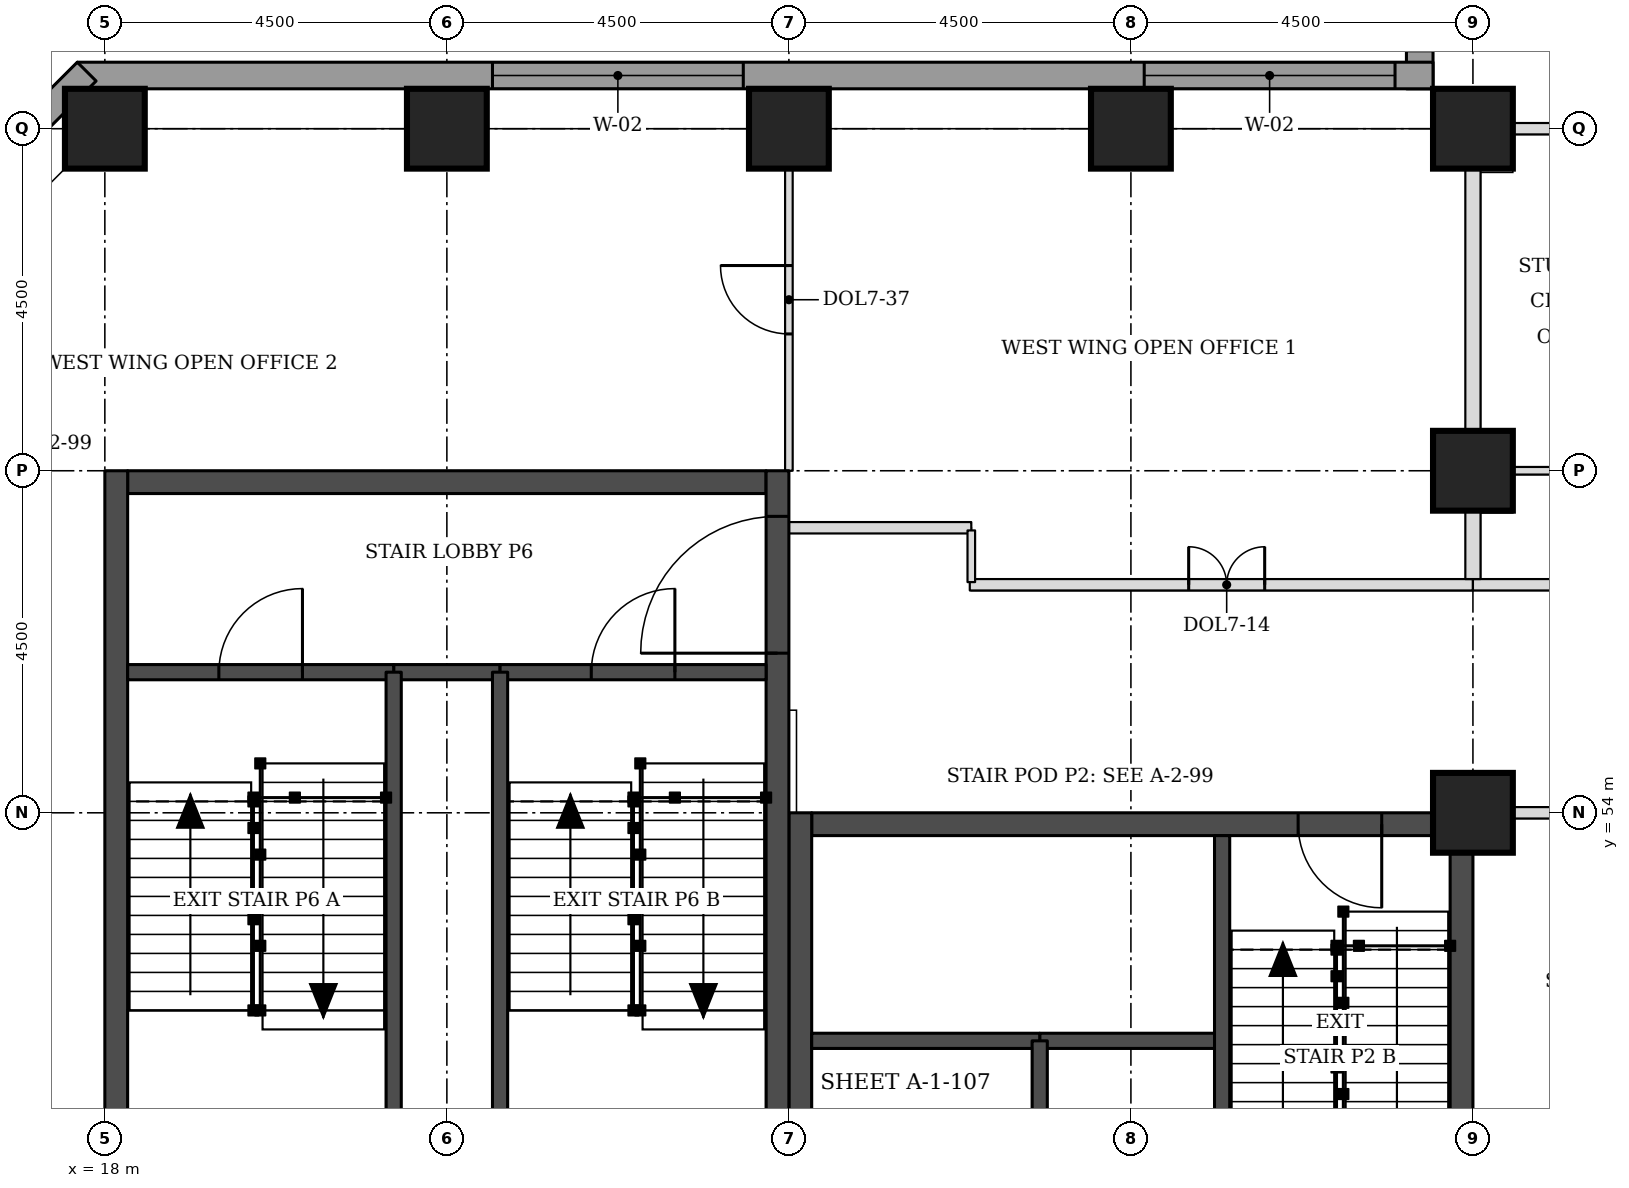
"""IFC4 building model, lengths in metres.
Left out: names, types, materials, properties, quantities, classifications, styles, units other than length and angle.
Written with IfcOpenShell. Run it as: python <this file> out.ifc"""

import sys

from ifc_helpers import new_model, si_unit, direction, frame, frame_2d, origin, origin_2d, place, context, subcontext, project, spatial, rectangle, extrude, element, fill, save


model = new_model("IFC4")
c1 = context("Model", 3, precision=1e-05, world=origin(), true_north=direction((0.0, 1.0)))
c2 = subcontext(c1, "Body", "Model", "MODEL_VIEW")
j1 = project(units=[si_unit("LENGTHUNIT", "METRE"), si_unit("PLANEANGLEUNIT", "RADIAN")], contexts=[c1])
p1 = place(None, origin())
s1 = spatial("IfcSite", under=j1, at=p1, CompositionType="ELEMENT")
p2 = place(p1, origin())
s2 = spatial("IfcBuilding", under=s1, at=p2, CompositionType="ELEMENT")
p3 = place(p2, frame((0.0, 0.0, 130.7)))
s3 = spatial("IfcBuildingStorey", under=s2, at=p3, CompositionType="ELEMENT", Elevation=130.7)
for number, where, z_axis, x_axis in (
    (1, (36.0, 54.0, 0.0), (0.0, 0.0, 1.0), (1.0, 0.0, 0.0)),
    (2, (36.0, 58.5, 0.0), (0.0, 0.0, 1.0), (1.0, 0.0, 0.0)),
    (3, (18.0, 63.0, 0.0), (0.0, 0.0, 1.0), (1.0, 0.0, 0.0)),
    (4, (22.5, 63.0, 0.0), (0.0, 0.0, 1.0), (1.0, 0.0, 0.0)),
    (5, (27.0, 63.0, 0.0), (0.0, 0.0, 1.0), (1.0, 0.0, 0.0)),
    (6, (31.5, 63.0, 0.0), (0.0, 0.0, 1.0), (1.0, 0.0, 0.0)),
    (7, (36.0, 63.0, 0.0), (0.0, 0.0, 1.0), (1.0, 0.0, 0.0)),
):
    element("IfcColumn", number, at=place(p3, frame(where, z_axis=z_axis, x_axis=x_axis)), inside=s3, PredefinedType="COLUMN", context=c2, shape_type="SweptSolid", body=[
        extrude(rectangle(XDim=1.05, YDim=1.05, at=origin_2d()), origin(), (0.0, 0.0, 1.0), 3.7),
    ])
p4 = place(p3, frame((27.3, 53.85, 0.0), z_axis=(0.0, 0.0, 1.0), x_axis=(1.0, 0.0, 0.0)))
e8 = element("IfcWall", 8, at=p4, inside=s3, PredefinedType="SHEAR", context=c2, shape_type="SweptSolid", body=[
    extrude(rectangle(XDim=8.4, YDim=0.3, at=frame_2d((4.2, 0.0))), origin(), (0.0, 0.0, 1.0), 3.7),
])
p5 = place(p4, frame((6.4, 0.0, 0.0)))
e9 = element("IfcOpeningElement", 9, at=p5, cuts=e8, PredefinedType="OPENING", context=c2, shape_type="SweptSolid", body=[
    extrude(rectangle(XDim=1.1, YDim=2.1, at=frame_2d((0.55, 1.05))), frame((0.0, 0.16, 0.0), z_axis=(0.0, -1.0, 0.0), x_axis=(1.0, 0.0, 0.0)), (0.0, 0.0, 1.0), 0.32),
])
p6 = place(p3, frame((27.15, 45.0, 0.0), z_axis=(0.0, 0.0, 1.0), x_axis=(0.0, 1.0, 0.0)))
e10 = element("IfcWall", 10, at=p6, inside=s3, PredefinedType="SHEAR", context=c2, shape_type="SweptSolid", body=[
    extrude(rectangle(XDim=9.0, YDim=0.3, at=frame_2d((4.5, 0.0))), origin(), (0.0, 0.0, 1.0), 3.7),
])
p7 = place(p6, frame((0.4, 0.0, 0.0)))
e11 = element("IfcOpeningElement", 11, at=p7, cuts=e10, PredefinedType="OPENING", context=c2, shape_type="SweptSolid", body=[
    extrude(rectangle(XDim=1.1, YDim=2.1, at=frame_2d((0.55, 1.05))), frame((0.0, 0.16, 0.0), z_axis=(0.0, -1.0, 0.0), x_axis=(1.0, 0.0, 0.0)), (0.0, 0.0, 1.0), 0.32),
])
p8 = place(p3, frame((35.85, 45.0, 0.0), z_axis=(0.0, 0.0, 1.0), x_axis=(0.0, 1.0, 0.0)))
e12 = element("IfcWall", 12, at=p8, inside=s3, PredefinedType="SHEAR", context=c2, shape_type="SweptSolid", body=[
    extrude(rectangle(XDim=9.0, YDim=0.3, at=frame_2d((4.5, 0.0))), origin(), (0.0, 0.0, 1.0), 3.7),
])
p9 = place(p3, frame((18.3, 58.35, 0.0), z_axis=(0.0, 0.0, 1.0), x_axis=(1.0, 0.0, 0.0)))
e13 = element("IfcWall", 13, at=p9, inside=s3, PredefinedType="SHEAR", context=c2, shape_type="SweptSolid", body=[
    extrude(rectangle(XDim=8.4, YDim=0.3, at=frame_2d((4.2, 0.0))), origin(), (0.0, 0.0, 1.0), 3.7),
])
p10 = place(p3, frame((18.15, 49.5, 0.0), z_axis=(0.0, 0.0, 1.0), x_axis=(0.0, 1.0, 0.0)))
e14 = element("IfcWall", 14, at=p10, inside=s3, PredefinedType="SHEAR", context=c2, shape_type="SweptSolid", body=[
    extrude(rectangle(XDim=9.0, YDim=0.3, at=frame_2d((4.5, 0.0))), origin(), (0.0, 0.0, 1.0), 3.7),
])
p11 = place(p3, frame((26.85, 49.5, 0.0), z_axis=(0.0, 0.0, 1.0), x_axis=(0.0, 1.0, 0.0)))
e15 = element("IfcWall", 15, at=p11, inside=s3, PredefinedType="SHEAR", context=c2, shape_type="SweptSolid", body=[
    extrude(rectangle(XDim=9.0, YDim=0.3, at=frame_2d((4.5, 0.0))), origin(), (0.0, 0.0, 1.0), 3.7),
])
p12 = place(p11, frame((6.6, 0.0, 0.0)))
e16 = element("IfcOpeningElement", 16, at=p12, cuts=e15, PredefinedType="OPENING", context=c2, shape_type="SweptSolid", body=[
    extrude(rectangle(XDim=1.8, YDim=2.1, at=frame_2d((0.9, 1.05))), frame((0.0, 0.16, 0.0), z_axis=(0.0, -1.0, 0.0), x_axis=(1.0, 0.0, 0.0)), (0.0, 0.0, 1.0), 0.32),
])
p13 = place(p3, frame((35.3, 76.862, 0.0), z_axis=(0.0, 0.0, 1.0), x_axis=(0.0, -1.0, 0.0)))
e17 = element("IfcWall", 17, at=p13, inside=s3, PredefinedType="STANDARD", context=c2, shape_type="SweptSolid", body=[
    extrude(rectangle(XDim=13.337, YDim=0.35, at=frame_2d((6.669, 0.0))), origin(), (0.0, 0.0, 1.0), 3.525),
])
p14 = place(p13, frame((9.537, 0.0, 0.9)))
e18 = element("IfcOpeningElement", 18, at=p14, cuts=e17, PredefinedType="OPENING", context=c2, shape_type="SweptSolid", body=[
    extrude(rectangle(XDim=3.3, YDim=1.9, at=frame_2d((1.65, 0.95))), frame((0.0, 0.185, 0.0), z_axis=(0.0, -1.0, 0.0), x_axis=(1.0, 0.0, 0.0)), (0.0, 0.0, 1.0), 0.37),
])
p15 = place(p3, frame((35.475, 63.7, 0.0), z_axis=(0.0, 0.0, 1.0), x_axis=(-1.0, 0.0, 0.0)))
e19 = element("IfcWall", 19, at=p15, inside=s3, PredefinedType="STANDARD", context=c2, shape_type="SweptSolid", body=[
    extrude(rectangle(XDim=17.837, YDim=0.35, at=frame_2d((8.919, 0.0))), origin(), (0.0, 0.0, 1.0), 3.525),
])
p16 = place(p15, frame((0.5, 0.0, 0.9)))
e20 = element("IfcOpeningElement", 20, at=p16, cuts=e19, PredefinedType="OPENING", context=c2, shape_type="SweptSolid", body=[
    extrude(rectangle(XDim=3.3, YDim=1.9, at=frame_2d((1.65, 0.95))), frame((0.0, 0.185, 0.0), z_axis=(0.0, -1.0, 0.0), x_axis=(1.0, 0.0, 0.0)), (0.0, 0.0, 1.0), 0.37),
])
p17 = place(p15, frame((9.075, 0.0, 0.9)))
e21 = element("IfcOpeningElement", 21, at=p17, cuts=e19, PredefinedType="OPENING", context=c2, shape_type="SweptSolid", body=[
    extrude(rectangle(XDim=3.3, YDim=1.9, at=frame_2d((1.65, 0.95))), frame((0.0, 0.185, 0.0), z_axis=(0.0, -1.0, 0.0), x_axis=(1.0, 0.0, 0.0)), (0.0, 0.0, 1.0), 0.37),
])
p18 = place(p3, frame((17.761, 63.751, 0.0), z_axis=(0.0, 0.0, 1.0), x_axis=(-0.707106781187, -0.707106781187, 0.0)))
e22 = element("IfcWall", 22, at=p18, inside=s3, PredefinedType="STANDARD", context=c2, shape_type="SweptSolid", body=[
    extrude(rectangle(XDim=7.089, YDim=0.35, at=frame_2d((3.544, 0.0))), origin(), (0.0, 0.0, 1.0), 3.525),
])
p19 = place(p18, frame((1.894, 0.0, 0.9)))
e23 = element("IfcOpeningElement", 23, at=p19, cuts=e22, PredefinedType="OPENING", context=c2, shape_type="SweptSolid", body=[
    extrude(rectangle(XDim=3.3, YDim=1.9, at=frame_2d((1.65, 0.95))), frame((0.0, 0.185, 0.0), z_axis=(0.0, -1.0, 0.0), x_axis=(1.0, 0.0, 0.0)), (0.0, 0.0, 1.0), 0.37),
])
p20 = place(p3, frame((36.525, 54.0, 0.0), z_axis=(0.0, 0.0, 1.0), x_axis=(1.0, 0.0, 0.0)))
e24 = element("IfcWall", 24, at=p20, inside=s3, PredefinedType="PARTITIONING", context=c2, shape_type="SweptSolid", body=[
    extrude(rectangle(XDim=5.55, YDim=0.15, at=frame_2d((2.775, 0.0))), origin(), (0.0, 0.0, 1.0), 3.55),
])
p21 = place(p3, frame((29.38, 57.0, 0.0), z_axis=(0.0, 0.0, 1.0), x_axis=(1.0, 0.0, 0.0)))
e25 = element("IfcWall", 25, at=p21, inside=s3, PredefinedType="PARTITIONING", context=c2, shape_type="SweptSolid", body=[
    extrude(rectangle(XDim=6.62, YDim=0.15, at=frame_2d((3.31, 0.0))), origin(), (0.0, 0.0, 1.0), 3.55),
])
p22 = place(p21, frame((2.88, 0.0, 0.0)))
e26 = element("IfcOpeningElement", 26, at=p22, cuts=e25, PredefinedType="OPENING", context=c2, shape_type="SweptSolid", body=[
    extrude(rectangle(XDim=1.0, YDim=2.1, at=frame_2d((0.5, 1.05))), frame((0.0, 0.085, 0.0), z_axis=(0.0, -1.0, 0.0), x_axis=(1.0, 0.0, 0.0)), (0.0, 0.0, 1.0), 0.17),
])
p23 = place(p3, frame((36.0, 57.0, 0.0), z_axis=(0.0, 0.0, 1.0), x_axis=(1.0, 0.0, 0.0)))
e27 = element("IfcWall", 27, at=p23, inside=s3, PredefinedType="PARTITIONING", context=c2, shape_type="SweptSolid", body=[
    extrude(rectangle(XDim=6.075, YDim=0.15, at=frame_2d((3.038, 0.0))), origin(), (0.0, 0.0, 1.0), 3.55),
])
p24 = place(p23, frame((2.55, 0.0, 0.0)))
e28 = element("IfcOpeningElement", 28, at=p24, cuts=e27, PredefinedType="OPENING", context=c2, shape_type="SweptSolid", body=[
    extrude(rectangle(XDim=1.0, YDim=2.1, at=frame_2d((0.5, 1.05))), frame((0.0, 0.085, 0.0), z_axis=(0.0, -1.0, 0.0), x_axis=(1.0, 0.0, 0.0)), (0.0, 0.0, 1.0), 0.17),
])
p25 = place(p3, frame((36.525, 58.5, 0.0), z_axis=(0.0, 0.0, 1.0), x_axis=(1.0, 0.0, 0.0)))
e29 = element("IfcWall", 29, at=p25, inside=s3, PredefinedType="PARTITIONING", context=c2, shape_type="SweptSolid", body=[
    extrude(rectangle(XDim=2.525, YDim=0.1, at=frame_2d((1.263, 0.0))), origin(), (0.0, 0.0, 1.0), 3.55),
])
p26 = place(p25, frame((0.8, 0.0, 0.0)))
e30 = element("IfcOpeningElement", 30, at=p26, cuts=e29, PredefinedType="OPENING", context=c2, shape_type="SweptSolid", body=[
    extrude(rectangle(XDim=0.9, YDim=2.1, at=frame_2d((0.45, 1.05))), frame((0.0, 0.06, 0.0), z_axis=(0.0, -1.0, 0.0), x_axis=(1.0, 0.0, 0.0)), (0.0, 0.0, 1.0), 0.12),
])
p27 = place(p3, frame((36.525, 63.0, 0.0), z_axis=(0.0, 0.0, 1.0), x_axis=(1.0, 0.0, 0.0)))
e31 = element("IfcWall", 31, at=p27, inside=s3, PredefinedType="PARTITIONING", context=c2, shape_type="SweptSolid", body=[
    extrude(rectangle(XDim=2.4, YDim=0.15, at=frame_2d((1.2, 0.0))), origin(), (0.0, 0.0, 1.0), 3.55),
])
p28 = place(p3, frame((36.0, 57.075, 0.0), z_axis=(0.0, 0.0, 1.0), x_axis=(0.0, 1.0, 0.0)))
e32 = element("IfcWall", 32, at=p28, inside=s3, PredefinedType="PARTITIONING", context=c2, shape_type="SweptSolid", body=[
    extrude(rectangle(XDim=0.9, YDim=0.2, at=frame_2d((0.45, 0.0))), origin(), (0.0, 0.0, 1.0), 2.8),
])
p29 = place(p3, frame((36.0, 58.995, 0.0), z_axis=(0.0, 0.0, 1.0), x_axis=(0.0, 1.0, 0.0)))
e33 = element("IfcWall", 33, at=p29, inside=s3, PredefinedType="PARTITIONING", context=c2, shape_type="SweptSolid", body=[
    extrude(rectangle(XDim=3.48, YDim=0.2, at=frame_2d((1.74, 0.0))), origin(), (0.0, 0.0, 1.0), 2.8),
])
p30 = place(p3, frame((27.0, 63.0, 0.0), z_axis=(0.0, 0.0, 1.0), x_axis=(0.0, -1.0, 0.0)))
e34 = element("IfcWall", 34, at=p30, inside=s3, PredefinedType="PARTITIONING", context=c2, shape_type="SweptSolid", body=[
    extrude(rectangle(XDim=4.5, YDim=0.1, at=frame_2d((2.25, 0.0))), origin(), (0.0, 0.0, 1.0), 3.55),
])
p31 = place(p30, frame((1.8, 0.0, 0.0)))
e35 = element("IfcOpeningElement", 35, at=p31, cuts=e34, PredefinedType="OPENING", context=c2, shape_type="SweptSolid", body=[
    extrude(rectangle(XDim=0.9, YDim=2.1, at=frame_2d((0.45, 1.05))), frame((0.0, 0.06, 0.0), z_axis=(0.0, -1.0, 0.0), x_axis=(1.0, 0.0, 0.0)), (0.0, 0.0, 1.0), 0.12),
])
p32 = place(p3, frame((27.0, 57.75, 0.0), z_axis=(0.0, 0.0, 1.0), x_axis=(1.0, 0.0, 0.0)))
e36 = element("IfcWall", 36, at=p32, inside=s3, PredefinedType="PARTITIONING", context=c2, shape_type="SweptSolid", body=[
    extrude(rectangle(XDim=2.4, YDim=0.15, at=frame_2d((1.2, 0.0))), origin(), (0.0, 0.0, 1.0), 3.55),
])
p33 = place(p3, frame((29.4, 57.715, 0.0), z_axis=(0.0, 0.0, 1.0), x_axis=(0.0, -1.0, 0.0)))
e37 = element("IfcWall", 37, at=p33, inside=s3, PredefinedType="PARTITIONING", context=c2, shape_type="SweptSolid", body=[
    extrude(rectangle(XDim=0.68, YDim=0.1, at=frame_2d((0.34, 0.0))), origin(), (0.0, 0.0, 1.0), 3.55),
])
p34 = place(p3, frame((30.3, 51.0, 0.0), z_axis=(0.0, 0.0, 1.0), x_axis=(1.0, 0.0, 0.0)))
e38 = element("IfcWall", 38, at=p34, inside=s3, PredefinedType="SOLIDWALL", context=c2, shape_type="SweptSolid", body=[
    extrude(rectangle(XDim=2.4, YDim=0.2, at=frame_2d((1.2, 0.0))), origin(), (0.0, 0.0, 1.0), 3.7),
])
p35 = place(p3, frame((27.3, 51.0, 0.0), z_axis=(0.0, 0.0, 1.0), x_axis=(1.0, 0.0, 0.0)))
e39 = element("IfcWall", 39, at=p35, inside=s3, PredefinedType="SOLIDWALL", context=c2, shape_type="SweptSolid", body=[
    extrude(rectangle(XDim=3.0, YDim=0.2, at=frame_2d((1.5, 0.0))), origin(), (0.0, 0.0, 1.0), 3.55),
])
for number, where, z_axis, x_axis in (
    (40, (30.3, 45.3, 0.0), (0.0, 0.0, 1.0), (0.0, 1.0, 0.0)),
    (41, (32.7, 48.0, 0.0), (0.0, 0.0, 1.0), (0.0, 1.0, 0.0)),
):
    element("IfcWall", number, at=place(p3, frame(where, z_axis=z_axis, x_axis=x_axis)), inside=s3, PredefinedType="SOLIDWALL", context=c2, shape_type="SweptSolid", body=[
        extrude(rectangle(XDim=5.7, YDim=0.2, at=frame_2d((2.85, 0.0))), origin(), (0.0, 0.0, 1.0), 3.55),
    ])
p36 = place(p3, frame((21.8, 55.85, 0.0), z_axis=(0.0, 0.0, 1.0), x_axis=(1.0, 0.0, 0.0)))
e42 = element("IfcWall", 42, at=p36, inside=s3, PredefinedType="SOLIDWALL", context=c2, shape_type="SweptSolid", body=[
    extrude(rectangle(XDim=1.4, YDim=0.2, at=frame_2d((0.7, 0.0))), origin(), (0.0, 0.0, 1.0), 3.55),
])
p37 = place(p3, frame((18.3, 55.85, 0.0), z_axis=(0.0, 0.0, 1.0), x_axis=(1.0, 0.0, 0.0)))
e43 = element("IfcWall", 43, at=p37, inside=s3, PredefinedType="SOLIDWALL", context=c2, shape_type="SweptSolid", body=[
    extrude(rectangle(XDim=3.5, YDim=0.2, at=frame_2d((1.75, 0.0))), origin(), (0.0, 0.0, 1.0), 3.55),
])
p38 = place(p37, frame((1.2, 0.0, 0.0)))
e44 = element("IfcOpeningElement", 44, at=p38, cuts=e43, PredefinedType="OPENING", context=c2, shape_type="SweptSolid", body=[
    extrude(rectangle(XDim=1.1, YDim=2.1, at=frame_2d((0.55, 1.05))), frame((0.0, 0.11, 0.0), z_axis=(0.0, -1.0, 0.0), x_axis=(1.0, 0.0, 0.0)), (0.0, 0.0, 1.0), 0.22),
])
p39 = place(p3, frame((23.2, 55.85, 0.0), z_axis=(0.0, 0.0, 1.0), x_axis=(1.0, 0.0, 0.0)))
e45 = element("IfcWall", 45, at=p39, inside=s3, PredefinedType="SOLIDWALL", context=c2, shape_type="SweptSolid", body=[
    extrude(rectangle(XDim=3.5, YDim=0.2, at=frame_2d((1.75, 0.0))), origin(), (0.0, 0.0, 1.0), 3.55),
])
p40 = place(p39, frame((1.2, 0.0, 0.0)))
e46 = element("IfcOpeningElement", 46, at=p40, cuts=e45, PredefinedType="OPENING", context=c2, shape_type="SweptSolid", body=[
    extrude(rectangle(XDim=1.1, YDim=2.1, at=frame_2d((0.55, 1.05))), frame((0.0, 0.11, 0.0), z_axis=(0.0, -1.0, 0.0), x_axis=(1.0, 0.0, 0.0)), (0.0, 0.0, 1.0), 0.22),
])
for number, where, z_axis, x_axis in (
    (47, (21.8, 49.8, 0.0), (0.0, 0.0, 1.0), (0.0, 1.0, 0.0)),
    (48, (23.2, 49.8, 0.0), (0.0, 0.0, 1.0), (0.0, 1.0, 0.0)),
):
    element("IfcWall", number, at=place(p3, frame(where, z_axis=z_axis, x_axis=x_axis)), inside=s3, PredefinedType="SOLIDWALL", context=c2, shape_type="SweptSolid", body=[
        extrude(rectangle(XDim=6.05, YDim=0.2, at=frame_2d((3.025, 0.0))), origin(), (0.0, 0.0, 1.0), 3.55),
    ])
p41 = place(p16, origin())
e49 = element("IfcWindow", 49, at=p41, inside=s3, PartitioningType="SINGLE_PANEL", PredefinedType="WINDOW", context=c2, shape_type="SweptSolid", body=[
    extrude(rectangle(XDim=3.3, YDim=1.9, at=frame_2d((1.65, 0.95))), frame((0.0, 0.085, 0.0), z_axis=(0.0, -1.0, 0.0), x_axis=(1.0, 0.0, 0.0)), (0.0, 0.0, 1.0), 0.06),
])
fill(e20, e49)
p42 = place(p17, origin())
e50 = element("IfcWindow", 50, at=p42, inside=s3, PartitioningType="SINGLE_PANEL", PredefinedType="WINDOW", context=c2, shape_type="SweptSolid", body=[
    extrude(rectangle(XDim=3.3, YDim=1.9, at=frame_2d((1.65, 0.95))), frame((0.0, 0.085, 0.0), z_axis=(0.0, -1.0, 0.0), x_axis=(1.0, 0.0, 0.0)), (0.0, 0.0, 1.0), 0.06),
])
fill(e21, e50)
p43 = place(p22, origin())
e51 = element("IfcDoor", 51, at=p43, inside=s3, OperationType="DOUBLE_DOOR_SINGLE_SWING", PredefinedType="DOOR", context=c2, shape_type="SweptSolid", body=[
    extrude(rectangle(XDim=1.0, YDim=2.1, at=frame_2d((0.5, 1.05))), frame((0.0, 0.025, 0.0), z_axis=(0.0, -1.0, 0.0), x_axis=(1.0, 0.0, 0.0)), (0.0, 0.0, 1.0), 0.05),
])
fill(e26, e51)
p44 = place(p31, frame((0.9, 0.0, 0.0), z_axis=(0.0, 0.0, 1.0), x_axis=(-1.0, 0.0, 0.0)))
e52 = element("IfcDoor", 52, at=p44, inside=s3, OperationType="SINGLE_SWING_RIGHT", PredefinedType="DOOR", context=c2, shape_type="SweptSolid", body=[
    extrude(rectangle(XDim=0.9, YDim=2.1, at=frame_2d((0.45, 1.05))), frame((0.0, 0.025, 0.0), z_axis=(0.0, -1.0, 0.0), x_axis=(1.0, 0.0, 0.0)), (0.0, 0.0, 1.0), 0.05),
])
fill(e35, e52)
p45 = place(p5, frame((1.1, 0.0, 0.0), z_axis=(0.0, 0.0, 1.0), x_axis=(-1.0, 0.0, 0.0)))
e53 = element("IfcDoor", 53, at=p45, inside=s3, OperationType="SINGLE_SWING_LEFT", PredefinedType="DOOR", context=c2, shape_type="SweptSolid", body=[
    extrude(rectangle(XDim=1.1, YDim=2.1, at=frame_2d((0.55, 1.05))), frame((0.0, 0.025, 0.0), z_axis=(0.0, -1.0, 0.0), x_axis=(1.0, 0.0, 0.0)), (0.0, 0.0, 1.0), 0.05),
])
fill(e9, e53)
p46 = place(p38, origin())
e54 = element("IfcDoor", 54, at=p46, inside=s3, OperationType="SINGLE_SWING_RIGHT", PredefinedType="DOOR", context=c2, shape_type="SweptSolid", body=[
    extrude(rectangle(XDim=1.1, YDim=2.1, at=frame_2d((0.55, 1.05))), frame((0.0, 0.025, 0.0), z_axis=(0.0, -1.0, 0.0), x_axis=(1.0, 0.0, 0.0)), (0.0, 0.0, 1.0), 0.05),
])
fill(e44, e54)
p47 = place(p40, origin())
e55 = element("IfcDoor", 55, at=p47, inside=s3, OperationType="SINGLE_SWING_RIGHT", PredefinedType="DOOR", context=c2, shape_type="SweptSolid", body=[
    extrude(rectangle(XDim=1.1, YDim=2.1, at=frame_2d((0.55, 1.05))), frame((0.0, 0.025, 0.0), z_axis=(0.0, -1.0, 0.0), x_axis=(1.0, 0.0, 0.0)), (0.0, 0.0, 1.0), 0.05),
])
fill(e46, e55)
p48 = place(p12, origin())
e56 = element("IfcDoor", 56, at=p48, inside=s3, OperationType="SINGLE_SWING_LEFT", PredefinedType="DOOR", context=c2, shape_type="SweptSolid", body=[
    extrude(rectangle(XDim=1.8, YDim=2.1, at=frame_2d((0.9, 1.05))), frame((0.0, 0.025, 0.0), z_axis=(0.0, -1.0, 0.0), x_axis=(1.0, 0.0, 0.0)), (0.0, 0.0, 1.0), 0.05),
])
fill(e16, e56)
save(model, sys.argv[1])
